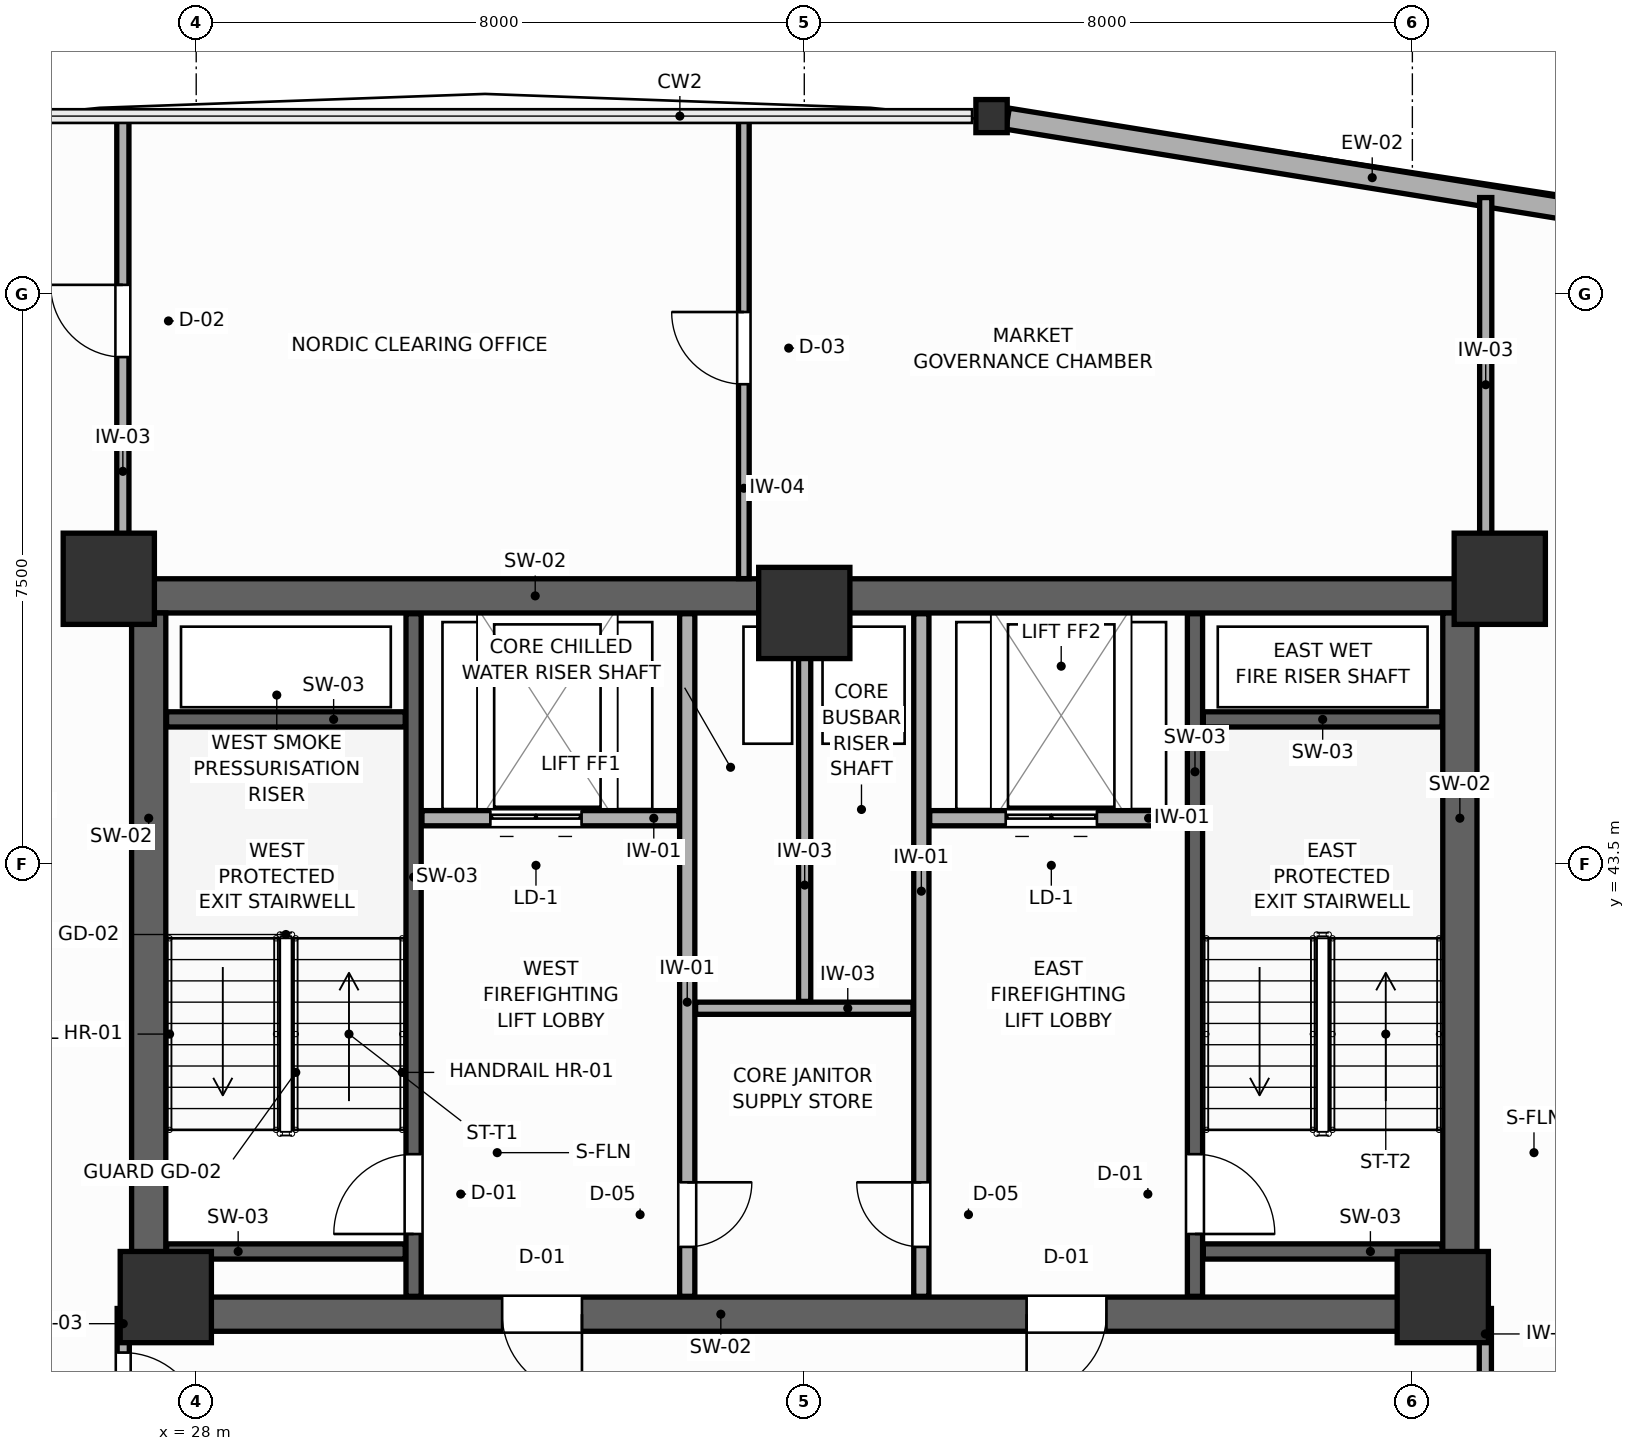
"""IFC4 building model, lengths in metres.
Left out: names, types, materials, properties, quantities, classifications, styles, units other than length and angle.
Written with IfcOpenShell. Run it as: python <this file> out.ifc"""

import sys

from ifc_helpers import new_model, si_unit, direction, frame, frame_2d, origin, origin_2d, place, context, subcontext, project, spatial, rectangle, i_section, extrude, source, transform, mapped, element, fill, save


model = new_model("IFC4")
c1 = context("Model", 3, precision=1e-05, world=origin(), true_north=direction((0.0, 1.0)))
c2 = subcontext(c1, "Body", "Model", "MODEL_VIEW")
j1 = project(units=[si_unit("LENGTHUNIT", "METRE"), si_unit("PLANEANGLEUNIT", "RADIAN")], contexts=[c1])
p1 = place(None, origin())
s1 = spatial("IfcSite", under=j1, at=p1, CompositionType="ELEMENT")
p2 = place(p1, origin())
s2 = spatial("IfcBuilding", under=s1, at=p2, CompositionType="ELEMENT")
p3 = place(p2, frame((0.0, 0.0, 139.8)))
s3 = spatial("IfcBuildingStorey", under=s2, at=p3, CompositionType="ELEMENT", Elevation=139.8)
p4 = place(p3, frame((27.15, 47.025, 0.0), z_axis=(0.0, 0.0, 1.0), x_axis=(1.0, 0.0, 0.0)))
e1 = element("IfcWall", 1, at=p4, inside=s3, PredefinedType="SHEAR", context=c2, shape_type="SweptSolid", body=[
    extrude(rectangle(XDim=17.7, YDim=0.45, at=frame_2d((8.85, 0.0))), origin(), (0.0, 0.0, 1.0), 3.6),
])
p5 = place(p3, frame((27.15, 37.575, 0.0), z_axis=(0.0, 0.0, 1.0), x_axis=(1.0, 0.0, 0.0)))
e2 = element("IfcWall", 2, at=p5, inside=s3, PredefinedType="SHEAR", context=c2, shape_type="SweptSolid", body=[
    extrude(rectangle(XDim=17.7, YDim=0.45, at=frame_2d((8.85, 0.0))), origin(), (0.0, 0.0, 1.0), 3.6),
])
p6 = place(p5, frame((4.875, 0.0, 0.0)))
e3 = element("IfcOpeningElement", 3, at=p6, cuts=e2, PredefinedType="OPENING", context=c2, shape_type="SweptSolid", body=[
    extrude(rectangle(XDim=1.05, YDim=2.1, at=frame_2d((0.525, 1.05))), frame((0.0, 0.235, 0.0), z_axis=(0.0, -1.0, 0.0), x_axis=(1.0, 0.0, 0.0)), (0.0, 0.0, 1.0), 0.47),
])
p7 = place(p5, frame((11.775, 0.0, 0.0)))
e4 = element("IfcOpeningElement", 4, at=p7, cuts=e2, PredefinedType="OPENING", context=c2, shape_type="SweptSolid", body=[
    extrude(rectangle(XDim=1.05, YDim=2.1, at=frame_2d((0.525, 1.05))), frame((0.0, 0.235, 0.0), z_axis=(0.0, -1.0, 0.0), x_axis=(1.0, 0.0, 0.0)), (0.0, 0.0, 1.0), 0.47),
])
for number, where, z_axis, x_axis in (
    (5, (27.375, 37.8, 0.0), (0.0, 0.0, 1.0), (0.0, 1.0, 0.0)),
    (6, (44.625, 37.8, 0.0), (0.0, 0.0, 1.0), (0.0, 1.0, 0.0)),
):
    element("IfcWall", number, at=place(p3, frame(where, z_axis=z_axis, x_axis=x_axis)), inside=s3, PredefinedType="SHEAR", context=c2, shape_type="SweptSolid", body=[
        extrude(rectangle(XDim=9.0, YDim=0.45, at=frame_2d((4.5, 0.0))), origin(), (0.0, 0.0, 1.0), 3.6),
    ])
m1 = source(origin(), c2, "Body", "SweptSolid", [
    extrude(rectangle(XDim=1.2, YDim=1.2, at=origin_2d()), origin(), (0.0, 0.0, 1.0), 3.6),
])
for number, where, z_axis, x_axis in (
    (7, (26.85, 47.25, 0.0), (0.0, 0.0, 1.0), (1.0, 0.0, 0.0)),
    (8, (45.15, 47.25, 0.0), (0.0, 0.0, 1.0), (1.0, 0.0, 0.0)),
    (9, (27.6, 37.8, 0.0), (0.0, 0.0, 1.0), (1.0, 0.0, 0.0)),
    (10, (44.4, 37.8, 0.0), (0.0, 0.0, 1.0), (1.0, 0.0, 0.0)),
    (11, (36.0, 46.8, 0.0), (0.0, 0.0, 1.0), (1.0, 0.0, 0.0)),
):
    element("IfcColumn", number, at=place(p3, frame(where, z_axis=z_axis, x_axis=x_axis)), inside=s3, PredefinedType="COLUMN", context=c2, shape_type="MappedRepresentation", body=[
        mapped(m1, transform((0.0, 0.0, 0.0), scale=1.0)),
    ])
m2 = source(origin(), c2, "Body", "SweptSolid", [
    extrude(i_section(OverallWidth=0.412, OverallDepth=0.435, WebThickness=0.033, FlangeThickness=0.053, FilletRadius=0.015, at=origin_2d()), origin(), (0.0, 0.0, 1.0), 3.6),
])
p8 = place(p3, frame((38.464, 53.337, 0.0), z_axis=(0.0, 0.0, 1.0), x_axis=(1.0, 0.0, 0.0)))
e12 = element("IfcColumn", 12, at=p8, inside=s3, PredefinedType="COLUMN", context=c2, shape_type="MappedRepresentation", body=[
    mapped(m2, transform((0.0, 0.0, 0.0), scale=1.0)),
])
p9 = place(p3, frame((53.646, 50.881, 0.0), z_axis=(0.0, 0.0, 1.0), x_axis=(-0.987165905884, 0.159698072185, 0.0)))
e13 = element("IfcWall", 13, at=p9, inside=s3, PredefinedType="SOLIDWALL", context=c2, shape_type="SweptSolid", body=[
    extrude(rectangle(XDim=15.165, YDim=0.28, at=frame_2d((7.583, 0.0))), origin(), (0.0, 0.0, 1.0), 3.0),
])
p10 = place(p9, frame((3.566, 0.0, 0.75)))
e14 = element("IfcOpeningElement", 14, at=p10, cuts=e13, PredefinedType="OPENING", context=c2, shape_type="SweptSolid", body=[
    extrude(rectangle(XDim=1.7, YDim=1.75, at=frame_2d((0.85, 0.875))), frame((0.0, 0.15, 0.0), z_axis=(0.0, -1.0, 0.0), x_axis=(1.0, 0.0, 0.0)), (0.0, 0.0, 1.0), 0.3),
])
p11 = place(p3, frame((30.86, 37.81, 0.0), z_axis=(0.0, 0.0, 1.0), x_axis=(0.0, 1.0, 0.0)))
e15 = element("IfcWall", 15, at=p11, inside=s3, PredefinedType="SHEAR", context=c2, shape_type="SweptSolid", body=[
    extrude(rectangle(XDim=8.98, YDim=0.2, at=frame_2d((4.49, 0.0))), origin(), (0.0, 0.0, 1.0), 3.6),
])
p12 = place(p11, frame((0.82, 0.0, 0.0)))
e16 = element("IfcOpeningElement", 16, at=p12, cuts=e15, PredefinedType="OPENING", context=c2, shape_type="SweptSolid", body=[
    extrude(rectangle(XDim=1.05, YDim=2.1, at=frame_2d((0.525, 1.05))), frame((0.0, 0.11, 0.0), z_axis=(0.0, -1.0, 0.0), x_axis=(1.0, 0.0, 0.0)), (0.0, 0.0, 1.0), 0.22),
])
for number, where, z_axis, x_axis in (
    (17, (27.61, 45.4, 0.0), (0.0, 0.0, 1.0), (1.0, 0.0, 0.0)),
    (18, (27.61, 38.4, 0.0), (0.0, 0.0, 1.0), (1.0, 0.0, 0.0)),
):
    element("IfcWall", number, at=place(p3, frame(where, z_axis=z_axis, x_axis=x_axis)), inside=s3, PredefinedType="SHEAR", context=c2, shape_type="SweptSolid", body=[
        extrude(rectangle(XDim=3.14, YDim=0.2, at=frame_2d((1.57, 0.0))), origin(), (0.0, 0.0, 1.0), 3.6),
    ])
p13 = place(p3, frame((41.14, 37.81, 0.0), z_axis=(0.0, 0.0, 1.0), x_axis=(0.0, 1.0, 0.0)))
e19 = element("IfcWall", 19, at=p13, inside=s3, PredefinedType="SHEAR", context=c2, shape_type="SweptSolid", body=[
    extrude(rectangle(XDim=8.98, YDim=0.2, at=frame_2d((4.49, 0.0))), origin(), (0.0, 0.0, 1.0), 3.6),
])
p14 = place(p13, frame((0.82, 0.0, 0.0)))
e20 = element("IfcOpeningElement", 20, at=p14, cuts=e19, PredefinedType="OPENING", context=c2, shape_type="SweptSolid", body=[
    extrude(rectangle(XDim=1.05, YDim=2.1, at=frame_2d((0.525, 1.05))), frame((0.0, 0.11, 0.0), z_axis=(0.0, -1.0, 0.0), x_axis=(1.0, 0.0, 0.0)), (0.0, 0.0, 1.0), 0.22),
])
for number, where, z_axis, x_axis in (
    (21, (41.25, 45.4, 0.0), (0.0, 0.0, 1.0), (1.0, 0.0, 0.0)),
    (22, (41.25, 38.4, 0.0), (0.0, 0.0, 1.0), (1.0, 0.0, 0.0)),
):
    element("IfcWall", number, at=place(p3, frame(where, z_axis=z_axis, x_axis=x_axis)), inside=s3, PredefinedType="SHEAR", context=c2, shape_type="SweptSolid", body=[
        extrude(rectangle(XDim=3.14, YDim=0.2, at=frame_2d((1.57, 0.0))), origin(), (0.0, 0.0, 1.0), 3.6),
    ])
p15 = place(p3, frame((30.97, 44.1, 0.0), z_axis=(0.0, 0.0, 1.0), x_axis=(1.0, 0.0, 0.0)))
e23 = element("IfcWall", 23, at=p15, inside=s3, PredefinedType="PARTITIONING", context=c2, shape_type="SweptSolid", body=[
    extrude(rectangle(XDim=3.38, YDim=0.2, at=frame_2d((1.69, 0.0))), origin(), (0.0, 0.0, 1.0), 3.4),
])
p16 = place(p15, frame((0.9, 0.0, 0.0)))
e24 = element("IfcOpeningElement", 24, at=p16, cuts=e23, PredefinedType="OPENING", context=c2, shape_type="SweptSolid", body=[
    extrude(rectangle(XDim=1.2, YDim=2.1, at=frame_2d((0.6, 1.05))), frame((0.0, 0.11, 0.0), z_axis=(0.0, -1.0, 0.0), x_axis=(1.0, 0.0, 0.0)), (0.0, 0.0, 1.0), 0.22),
])
p17 = place(p3, frame((37.65, 44.1, 0.0), z_axis=(0.0, 0.0, 1.0), x_axis=(1.0, 0.0, 0.0)))
e25 = element("IfcWall", 25, at=p17, inside=s3, PredefinedType="PARTITIONING", context=c2, shape_type="SweptSolid", body=[
    extrude(rectangle(XDim=3.38, YDim=0.2, at=frame_2d((1.69, 0.0))), origin(), (0.0, 0.0, 1.0), 3.4),
])
p18 = place(p17, frame((1.0, 0.0, 0.0)))
e26 = element("IfcOpeningElement", 26, at=p18, cuts=e25, PredefinedType="OPENING", context=c2, shape_type="SweptSolid", body=[
    extrude(rectangle(XDim=1.2, YDim=2.1, at=frame_2d((0.6, 1.05))), frame((0.0, 0.11, 0.0), z_axis=(0.0, -1.0, 0.0), x_axis=(1.0, 0.0, 0.0)), (0.0, 0.0, 1.0), 0.22),
])
p19 = place(p3, frame((34.46, 37.81, 0.0), z_axis=(0.0, 0.0, 1.0), x_axis=(0.0, 1.0, 0.0)))
e27 = element("IfcWall", 27, at=p19, inside=s3, PredefinedType="PARTITIONING", context=c2, shape_type="SweptSolid", body=[
    extrude(rectangle(XDim=8.98, YDim=0.2, at=frame_2d((4.49, 0.0))), origin(), (0.0, 0.0, 1.0), 3.4),
])
p20 = place(p19, frame((0.65, 0.0, 0.0)))
e28 = element("IfcOpeningElement", 28, at=p20, cuts=e27, PredefinedType="OPENING", context=c2, shape_type="SweptSolid", body=[
    extrude(rectangle(XDim=0.85, YDim=2.05, at=frame_2d((0.425, 1.025))), frame((0.0, 0.11, 0.0), z_axis=(0.0, -1.0, 0.0), x_axis=(1.0, 0.0, 0.0)), (0.0, 0.0, 1.0), 0.22),
])
p21 = place(p3, frame((37.54, 37.81, 0.0), z_axis=(0.0, 0.0, 1.0), x_axis=(0.0, 1.0, 0.0)))
e29 = element("IfcWall", 29, at=p21, inside=s3, PredefinedType="PARTITIONING", context=c2, shape_type="SweptSolid", body=[
    extrude(rectangle(XDim=8.98, YDim=0.2, at=frame_2d((4.49, 0.0))), origin(), (0.0, 0.0, 1.0), 3.4),
])
p22 = place(p21, frame((0.65, 0.0, 0.0)))
e30 = element("IfcOpeningElement", 30, at=p22, cuts=e29, PredefinedType="OPENING", context=c2, shape_type="SweptSolid", body=[
    extrude(rectangle(XDim=0.85, YDim=2.05, at=frame_2d((0.425, 1.025))), frame((0.0, 0.11, 0.0), z_axis=(0.0, -1.0, 0.0), x_axis=(1.0, 0.0, 0.0)), (0.0, 0.0, 1.0), 0.22),
])
p23 = place(p3, frame((34.57, 41.6, 0.0), z_axis=(0.0, 0.0, 1.0), x_axis=(1.0, 0.0, 0.0)))
e31 = element("IfcWall", 31, at=p23, inside=s3, PredefinedType="PARTITIONING", context=c2, shape_type="SweptSolid", body=[
    extrude(rectangle(XDim=2.86, YDim=0.16, at=frame_2d((1.43, 0.0))), origin(), (0.0, 0.0, 1.0), 3.4),
])
p24 = place(p3, frame((36.005, 41.69, 0.0), z_axis=(0.0, 0.0, 1.0), x_axis=(0.0, 1.0, 0.0)))
e32 = element("IfcWall", 32, at=p24, inside=s3, PredefinedType="PARTITIONING", context=c2, shape_type="SweptSolid", body=[
    extrude(rectangle(XDim=5.1, YDim=0.16, at=frame_2d((2.55, 0.0))), origin(), (0.0, 0.0, 1.0), 3.4),
])
p25 = place(p3, frame((27.04, 35.54, 0.0), z_axis=(0.0, 0.0, 1.0), x_axis=(0.0, 1.0, 0.0)))
e33 = element("IfcWall", 33, at=p25, inside=s3, PredefinedType="PARTITIONING", context=c2, shape_type="SweptSolid", body=[
    extrude(rectangle(XDim=2.11, YDim=0.16, at=frame_2d((1.055, 0.0))), origin(), (0.0, 0.0, 1.0), 3.4),
])
p26 = place(p25, frame((0.48, 0.0, 0.0)))
e34 = element("IfcOpeningElement", 34, at=p26, cuts=e33, PredefinedType="OPENING", context=c2, shape_type="SweptSolid", body=[
    extrude(rectangle(XDim=1.05, YDim=2.1, at=frame_2d((0.525, 1.05))), frame((0.0, 0.09, 0.0), z_axis=(0.0, -1.0, 0.0), x_axis=(1.0, 0.0, 0.0)), (0.0, 0.0, 1.0), 0.18),
])
p27 = place(p3, frame((44.96, 35.0, 0.0), z_axis=(0.0, 0.0, 1.0), x_axis=(0.0, 1.0, 0.0)))
e35 = element("IfcWall", 35, at=p27, inside=s3, PredefinedType="PARTITIONING", context=c2, shape_type="SweptSolid", body=[
    extrude(rectangle(XDim=2.65, YDim=0.16, at=frame_2d((1.325, 0.0))), origin(), (0.0, 0.0, 1.0), 3.4),
])
p28 = place(p27, frame((0.75, 0.0, 0.0)))
e36 = element("IfcOpeningElement", 36, at=p28, cuts=e35, PredefinedType="OPENING", context=c2, shape_type="SweptSolid", body=[
    extrude(rectangle(XDim=1.05, YDim=2.1, at=frame_2d((0.525, 1.05))), frame((0.0, 0.09, 0.0), z_axis=(0.0, -1.0, 0.0), x_axis=(1.0, 0.0, 0.0)), (0.0, 0.0, 1.0), 0.18),
])
p29 = place(p3, frame((27.035, 47.34, 0.0), z_axis=(0.0, 0.0, 1.0), x_axis=(0.0, 1.0, 0.0)))
e37 = element("IfcWall", 37, at=p29, inside=s3, PredefinedType="PARTITIONING", context=c2, shape_type="SweptSolid", body=[
    extrude(rectangle(XDim=5.977, YDim=0.16, at=frame_2d((2.988, 0.0))), origin(), (0.0, 0.0, 1.0), 3.4),
])
p30 = place(p29, frame((2.827, 0.0, 0.0)))
e38 = element("IfcOpeningElement", 38, at=p30, cuts=e37, PredefinedType="OPENING", context=c2, shape_type="SweptSolid", body=[
    extrude(rectangle(XDim=0.95, YDim=2.05, at=frame_2d((0.475, 1.025))), frame((0.0, 0.09, 0.0), z_axis=(0.0, -1.0, 0.0), x_axis=(1.0, 0.0, 0.0)), (0.0, 0.0, 1.0), 0.18),
])
p31 = place(p3, frame((44.965, 47.34, 0.0), z_axis=(0.0, 0.0, 1.0), x_axis=(0.0, 1.0, 0.0)))
e39 = element("IfcWall", 39, at=p31, inside=s3, PredefinedType="PARTITIONING", context=c2, shape_type="SweptSolid", body=[
    extrude(rectangle(XDim=4.925, YDim=0.16, at=frame_2d((2.463, 0.0))), origin(), (0.0, 0.0, 1.0), 3.4),
])
p32 = place(p3, frame((35.205, 47.252, 0.0), z_axis=(0.0, 0.0, 1.0), x_axis=(0.0, 1.0, 0.0)))
e40 = element("IfcWall", 40, at=p32, inside=s3, PredefinedType="PARTITIONING", context=c2, shape_type="SweptSolid", body=[
    extrude(rectangle(XDim=6.065, YDim=0.14, at=frame_2d((3.032, 0.0))), origin(), (0.0, 0.0, 1.0), 3.4),
])
p33 = place(p32, frame((2.558, 0.0, 0.0)))
e41 = element("IfcOpeningElement", 41, at=p33, cuts=e40, PredefinedType="OPENING", context=c2, shape_type="SweptSolid", body=[
    extrude(rectangle(XDim=0.95, YDim=2.05, at=frame_2d((0.475, 1.025))), frame((0.0, 0.08, 0.0), z_axis=(0.0, -1.0, 0.0), x_axis=(1.0, 0.0, 0.0)), (0.0, 0.0, 1.0), 0.16),
])
p34 = place(p12, origin())
e42 = element("IfcDoor", 42, at=p34, inside=s3, OperationType="SINGLE_SWING_LEFT", PredefinedType="DOOR", context=c2, shape_type="SweptSolid", body=[
    extrude(rectangle(XDim=1.05, YDim=2.1, at=frame_2d((0.525, 1.05))), frame((0.0, 0.025, 0.0), z_axis=(0.0, -1.0, 0.0), x_axis=(1.0, 0.0, 0.0)), (0.0, 0.0, 1.0), 0.05),
])
fill(e16, e42)
p35 = place(p14, frame((1.05, 0.0, 0.0), z_axis=(0.0, 0.0, 1.0), x_axis=(-1.0, 0.0, 0.0)))
e43 = element("IfcDoor", 43, at=p35, inside=s3, OperationType="SINGLE_SWING_RIGHT", PredefinedType="DOOR", context=c2, shape_type="SweptSolid", body=[
    extrude(rectangle(XDim=1.05, YDim=2.1, at=frame_2d((0.525, 1.05))), frame((0.0, 0.025, 0.0), z_axis=(0.0, -1.0, 0.0), x_axis=(1.0, 0.0, 0.0)), (0.0, 0.0, 1.0), 0.05),
])
fill(e20, e43)
p36 = place(p16, origin())
e44 = element("IfcDoor", 44, at=p36, inside=s3, OperationType="DOUBLE_DOOR_SLIDING", PredefinedType="DOOR", context=c2, shape_type="SweptSolid", body=[
    extrude(rectangle(XDim=1.2, YDim=2.1, at=frame_2d((0.6, 1.05))), frame((0.0, 0.025, 0.0), z_axis=(0.0, -1.0, 0.0), x_axis=(1.0, 0.0, 0.0)), (0.0, 0.0, 1.0), 0.05),
])
fill(e24, e44)
p37 = place(p18, origin())
e45 = element("IfcDoor", 45, at=p37, inside=s3, OperationType="DOUBLE_DOOR_SLIDING", PredefinedType="DOOR", context=c2, shape_type="SweptSolid", body=[
    extrude(rectangle(XDim=1.2, YDim=2.1, at=frame_2d((0.6, 1.05))), frame((0.0, 0.025, 0.0), z_axis=(0.0, -1.0, 0.0), x_axis=(1.0, 0.0, 0.0)), (0.0, 0.0, 1.0), 0.05),
])
fill(e26, e45)
p38 = place(p20, frame((0.85, 0.0, 0.0), z_axis=(0.0, 0.0, 1.0), x_axis=(-1.0, 0.0, 0.0)))
e46 = element("IfcDoor", 46, at=p38, inside=s3, OperationType="SINGLE_SWING_LEFT", PredefinedType="DOOR", context=c2, shape_type="SweptSolid", body=[
    extrude(rectangle(XDim=0.85, YDim=2.05, at=frame_2d((0.425, 1.025))), frame((0.0, 0.025, 0.0), z_axis=(0.0, -1.0, 0.0), x_axis=(1.0, 0.0, 0.0)), (0.0, 0.0, 1.0), 0.05),
])
fill(e28, e46)
p39 = place(p22, origin())
e47 = element("IfcDoor", 47, at=p39, inside=s3, OperationType="SINGLE_SWING_RIGHT", PredefinedType="DOOR", context=c2, shape_type="SweptSolid", body=[
    extrude(rectangle(XDim=0.85, YDim=2.05, at=frame_2d((0.425, 1.025))), frame((0.0, 0.025, 0.0), z_axis=(0.0, -1.0, 0.0), x_axis=(1.0, 0.0, 0.0)), (0.0, 0.0, 1.0), 0.05),
])
fill(e30, e47)
p40 = place(p26, frame((1.05, 0.0, 0.0), z_axis=(0.0, 0.0, 1.0), x_axis=(-1.0, 0.0, 0.0)))
e48 = element("IfcDoor", 48, at=p40, inside=s3, OperationType="SINGLE_SWING_RIGHT", PredefinedType="DOOR", context=c2, shape_type="SweptSolid", body=[
    extrude(rectangle(XDim=1.05, YDim=2.1, at=frame_2d((0.525, 1.05))), frame((0.0, 0.025, 0.0), z_axis=(0.0, -1.0, 0.0), x_axis=(1.0, 0.0, 0.0)), (0.0, 0.0, 1.0), 0.05),
])
fill(e34, e48)
p41 = place(p30, origin())
e49 = element("IfcDoor", 49, at=p41, inside=s3, OperationType="SINGLE_SWING_RIGHT", PredefinedType="DOOR", context=c2, shape_type="SweptSolid", body=[
    extrude(rectangle(XDim=0.95, YDim=2.05, at=frame_2d((0.475, 1.025))), frame((0.0, 0.025, 0.0), z_axis=(0.0, -1.0, 0.0), x_axis=(1.0, 0.0, 0.0)), (0.0, 0.0, 1.0), 0.05),
])
fill(e38, e49)
p42 = place(p33, origin())
e50 = element("IfcDoor", 50, at=p42, inside=s3, OperationType="SINGLE_SWING_RIGHT", PredefinedType="DOOR", context=c2, shape_type="SweptSolid", body=[
    extrude(rectangle(XDim=0.95, YDim=2.05, at=frame_2d((0.475, 1.025))), frame((0.0, 0.025, 0.0), z_axis=(0.0, -1.0, 0.0), x_axis=(1.0, 0.0, 0.0)), (0.0, 0.0, 1.0), 0.05),
])
fill(e41, e50)
p43 = place(p6, frame((1.05, 0.0, 0.0), z_axis=(0.0, 0.0, 1.0), x_axis=(-1.0, 0.0, 0.0)))
e51 = element("IfcDoor", 51, at=p43, inside=s3, OperationType="SINGLE_SWING_LEFT", PredefinedType="DOOR", context=c2, shape_type="SweptSolid", body=[
    extrude(rectangle(XDim=1.05, YDim=2.1, at=frame_2d((0.525, 1.05))), frame((0.0, 0.025, 0.0), z_axis=(0.0, -1.0, 0.0), x_axis=(1.0, 0.0, 0.0)), (0.0, 0.0, 1.0), 0.05),
])
fill(e3, e51)
p44 = place(p7, frame((1.05, 0.0, 0.0), z_axis=(0.0, 0.0, 1.0), x_axis=(-1.0, 0.0, 0.0)))
e52 = element("IfcDoor", 52, at=p44, inside=s3, OperationType="SINGLE_SWING_RIGHT", PredefinedType="DOOR", context=c2, shape_type="SweptSolid", body=[
    extrude(rectangle(XDim=1.05, YDim=2.1, at=frame_2d((0.525, 1.05))), frame((0.0, 0.025, 0.0), z_axis=(0.0, -1.0, 0.0), x_axis=(1.0, 0.0, 0.0)), (0.0, 0.0, 1.0), 0.05),
])
fill(e4, e52)
save(model, sys.argv[1])
